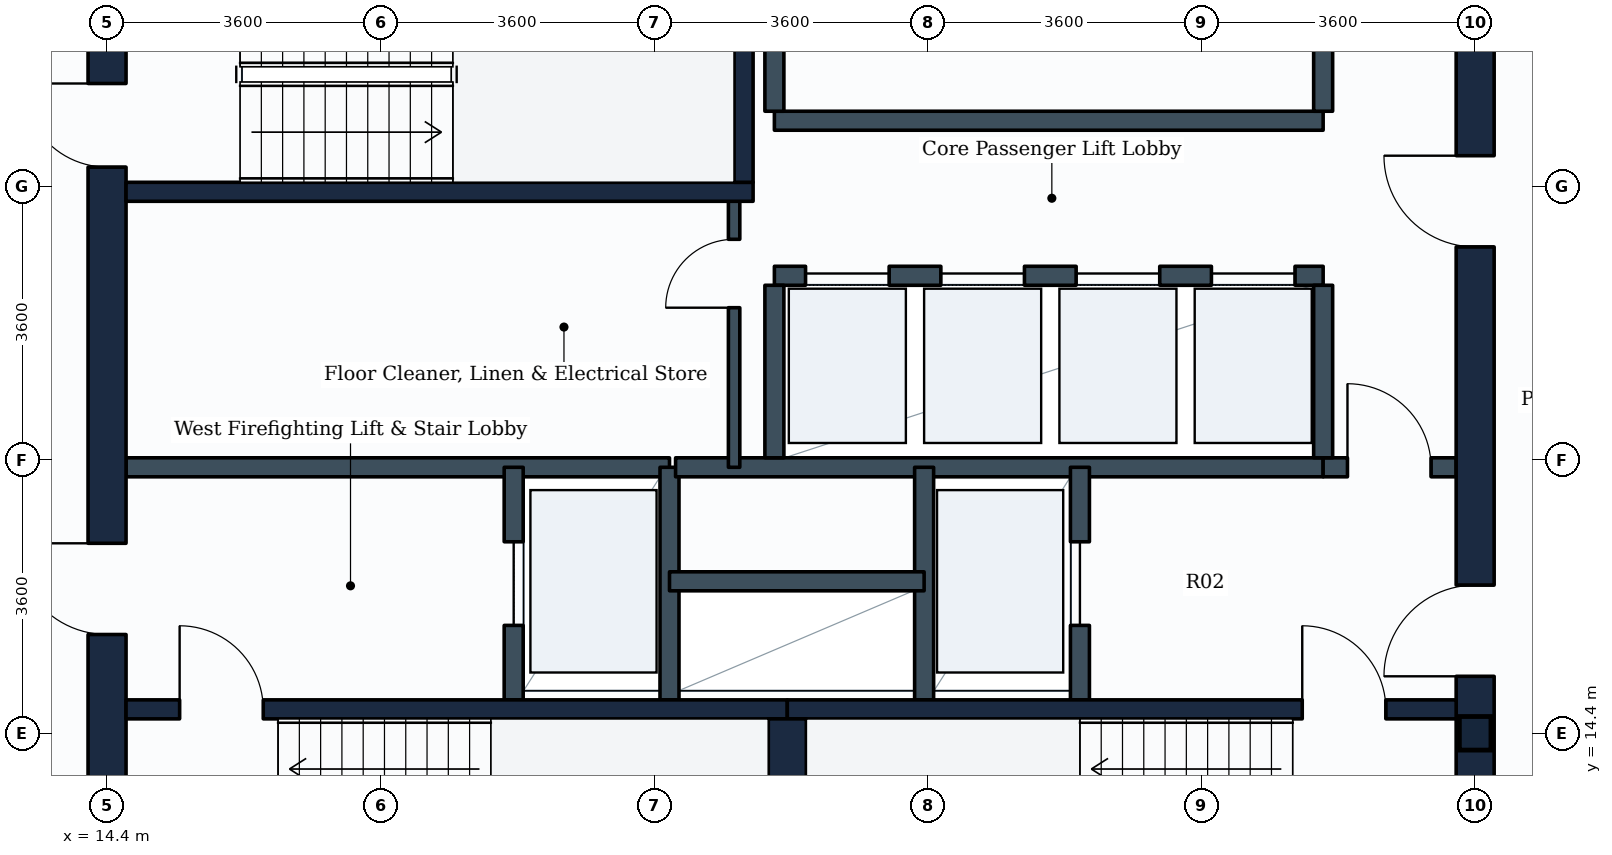
"""IFC4 building model, lengths in metres.
Left out: names, types, materials, properties, quantities, classifications, styles, units other than length and angle.
Written with IfcOpenShell. Run it as: python <this file> out.ifc"""

import sys

from ifc_helpers import new_model, si_unit, direction, frame, frame_2d, origin, origin_2d, place, context, subcontext, project, spatial, rectangle, i_section, extrude, element, fill, save


model = new_model("IFC4")
c1 = context("Model", 3, precision=1e-05, world=origin(), true_north=direction((0.0, 1.0)))
c2 = subcontext(c1, "Body", "Model", "MODEL_VIEW")
j1 = project(units=[si_unit("LENGTHUNIT", "METRE"), si_unit("PLANEANGLEUNIT", "RADIAN")], contexts=[c1])
p1 = place(None, origin())
s1 = spatial("IfcSite", under=j1, at=p1, CompositionType="ELEMENT")
p2 = place(p1, origin())
s2 = spatial("IfcBuilding", under=s1, at=p2, CompositionType="ELEMENT")
p3 = place(p2, frame((0.0, 0.0, 201.4)))
s3 = spatial("IfcBuildingStorey", under=s2, at=p3, CompositionType="ELEMENT", Elevation=201.4)
p4 = place(p3, frame((32.4, 14.4, 0.0), z_axis=(0.0, 0.0, 1.0), x_axis=(1.0, 0.0, 0.0)))
e1 = element("IfcColumn", 1, at=p4, inside=s3, PredefinedType="COLUMN", context=c2, shape_type="SweptSolid", body=[
    extrude(i_section(OverallWidth=0.416, OverallDepth=0.442, WebThickness=0.025, FlangeThickness=0.041, FilletRadius=0.015, at=origin_2d()), origin(), (0.0, 0.0, 1.0), 3.8),
])
p5 = place(p3, frame((14.4, 10.8, 0.0), z_axis=(0.0, 0.0, 1.0), x_axis=(0.0, 1.0, 0.0)))
e2 = element("IfcWall", 2, at=p5, inside=s3, PredefinedType="SHEAR", context=c2, shape_type="SweptSolid", body=[
    extrude(rectangle(XDim=14.4, YDim=0.5, at=frame_2d((7.2, 0.0))), origin(), (0.0, 0.0, 1.0), 3.55),
])
p6 = place(p5, frame((11.05, 0.0, 0.0)))
e3 = element("IfcOpeningElement", 3, at=p6, cuts=e2, PredefinedType="OPENING", context=c2, shape_type="SweptSolid", body=[
    extrude(rectangle(XDim=1.1, YDim=2.1, at=frame_2d((0.55, 1.05))), frame((0.0, 0.26, 0.0), z_axis=(0.0, -1.0, 0.0), x_axis=(1.0, 0.0, 0.0)), (0.0, 0.0, 1.0), 0.52),
])
p7 = place(p5, frame((4.9, 0.0, 0.0)))
e4 = element("IfcOpeningElement", 4, at=p7, cuts=e2, PredefinedType="OPENING", context=c2, shape_type="SweptSolid", body=[
    extrude(rectangle(XDim=1.2, YDim=2.1, at=frame_2d((0.6, 1.05))), frame((0.0, 0.26, 0.0), z_axis=(0.0, -1.0, 0.0), x_axis=(1.0, 0.0, 0.0)), (0.0, 0.0, 1.0), 0.52),
])
p8 = place(p3, frame((32.4, 10.8, 0.0), z_axis=(0.0, 0.0, 1.0), x_axis=(0.0, 1.0, 0.0)))
e5 = element("IfcWall", 5, at=p8, inside=s3, PredefinedType="SHEAR", context=c2, shape_type="SweptSolid", body=[
    extrude(rectangle(XDim=14.4, YDim=0.5, at=frame_2d((7.2, 0.0))), origin(), (0.0, 0.0, 1.0), 3.55),
])
p9 = place(p8, frame((4.35, 0.0, 0.0)))
e6 = element("IfcOpeningElement", 6, at=p9, cuts=e5, PredefinedType="OPENING", context=c2, shape_type="SweptSolid", body=[
    extrude(rectangle(XDim=1.2, YDim=2.1, at=frame_2d((0.6, 1.05))), frame((0.0, 0.26, 0.0), z_axis=(0.0, -1.0, 0.0), x_axis=(1.0, 0.0, 0.0)), (0.0, 0.0, 1.0), 0.52),
])
p10 = place(p8, frame((10.0, 0.0, 0.0)))
e7 = element("IfcOpeningElement", 7, at=p10, cuts=e5, PredefinedType="OPENING", context=c2, shape_type="SweptSolid", body=[
    extrude(rectangle(XDim=1.2, YDim=2.1, at=frame_2d((0.6, 1.05))), frame((0.0, 0.26, 0.0), z_axis=(0.0, -1.0, 0.0), x_axis=(1.0, 0.0, 0.0)), (0.0, 0.0, 1.0), 0.52),
])
p11 = place(p3, frame((14.65, 14.715, 0.0), z_axis=(0.0, 0.0, 1.0), x_axis=(1.0, 0.0, 0.0)))
e8 = element("IfcWall", 8, at=p11, inside=s3, PredefinedType="SHEAR", context=c2, shape_type="SweptSolid", body=[
    extrude(rectangle(XDim=8.7, YDim=0.25, at=frame_2d((4.35, 0.0))), origin(), (0.0, 0.0, 1.0), 3.55),
])
p12 = place(p11, frame((0.705, 0.0, 0.0)))
e9 = element("IfcOpeningElement", 9, at=p12, cuts=e8, PredefinedType="OPENING", context=c2, shape_type="SweptSolid", body=[
    extrude(rectangle(XDim=1.1, YDim=2.1, at=frame_2d((0.55, 1.05))), frame((0.0, 0.135, 0.0), z_axis=(0.0, -1.0, 0.0), x_axis=(1.0, 0.0, 0.0)), (0.0, 0.0, 1.0), 0.27),
])
p13 = place(p3, frame((23.35, 14.715, 0.0), z_axis=(0.0, 0.0, 1.0), x_axis=(1.0, 0.0, 0.0)))
e10 = element("IfcWall", 10, at=p13, inside=s3, PredefinedType="SHEAR", context=c2, shape_type="SweptSolid", body=[
    extrude(rectangle(XDim=8.8, YDim=0.25, at=frame_2d((4.4, 0.0))), origin(), (0.0, 0.0, 1.0), 3.55),
])
p14 = place(p13, frame((6.775, 0.0, 0.0)))
e11 = element("IfcOpeningElement", 11, at=p14, cuts=e10, PredefinedType="OPENING", context=c2, shape_type="SweptSolid", body=[
    extrude(rectangle(XDim=1.1, YDim=2.1, at=frame_2d((0.55, 1.05))), frame((0.0, 0.135, 0.0), z_axis=(0.0, -1.0, 0.0), x_axis=(1.0, 0.0, 0.0)), (0.0, 0.0, 1.0), 0.27),
])
p15 = place(p3, frame((23.35, 11.75, 0.0), z_axis=(0.0, 0.0, 1.0), x_axis=(0.0, 1.0, 0.0)))
e12 = element("IfcWall", 12, at=p15, inside=s3, PredefinedType="SHEAR", context=c2, shape_type="SweptSolid", body=[
    extrude(rectangle(XDim=2.84, YDim=0.5, at=frame_2d((1.42, 0.0))), origin(), (0.0, 0.0, 1.0), 3.55),
])
p16 = place(p3, frame((14.65, 21.525, 0.0), z_axis=(0.0, 0.0, 1.0), x_axis=(1.0, 0.0, 0.0)))
e13 = element("IfcWall", 13, at=p16, inside=s3, PredefinedType="SHEAR", context=c2, shape_type="SweptSolid", body=[
    extrude(rectangle(XDim=8.25, YDim=0.25, at=frame_2d((4.125, 0.0))), origin(), (0.0, 0.0, 1.0), 3.55),
])
p17 = place(p3, frame((22.775, 21.65, 0.0), z_axis=(0.0, 0.0, 1.0), x_axis=(0.0, 1.0, 0.0)))
e14 = element("IfcWall", 14, at=p17, inside=s3, PredefinedType="SHEAR", context=c2, shape_type="SweptSolid", body=[
    extrude(rectangle(XDim=2.84, YDim=0.25, at=frame_2d((1.42, 0.0))), origin(), (0.0, 0.0, 1.0), 3.55),
])
p18 = place(p3, frame((14.65, 17.9, 0.0), z_axis=(0.0, 0.0, 1.0), x_axis=(1.0, 0.0, 0.0)))
e15 = element("IfcWall", 15, at=p18, inside=s3, PredefinedType="PARTITIONING", context=c2, shape_type="SweptSolid", body=[
    extrude(rectangle(XDim=7.15, YDim=0.25, at=frame_2d((3.575, 0.0))), origin(), (0.0, 0.0, 1.0), 3.535),
])
p19 = place(p3, frame((19.75, 14.84, 0.0), z_axis=(0.0, 0.0, 1.0), x_axis=(0.0, 1.0, 0.0)))
e16 = element("IfcWall", 16, at=p19, inside=s3, PredefinedType="PARTITIONING", context=c2, shape_type="SweptSolid", body=[
    extrude(rectangle(XDim=3.06, YDim=0.25, at=frame_2d((1.53, 0.0))), origin(), (0.0, 0.0, 1.0), 3.535),
])
p20 = place(p19, frame((0.98, 0.0, 0.0)))
e17 = element("IfcOpeningElement", 17, at=p20, cuts=e16, PredefinedType="OPENING", context=c2, shape_type="SweptSolid", body=[
    extrude(rectangle(XDim=1.1, YDim=2.1, at=frame_2d((0.55, 1.05))), frame((0.0, 0.135, 0.0), z_axis=(0.0, -1.0, 0.0), x_axis=(1.0, 0.0, 0.0)), (0.0, 0.0, 1.0), 0.27),
])
p21 = place(p3, frame((21.8, 14.84, 0.0), z_axis=(0.0, 0.0, 1.0), x_axis=(0.0, 1.0, 0.0)))
e18 = element("IfcWall", 18, at=p21, inside=s3, PredefinedType="PARTITIONING", context=c2, shape_type="SweptSolid", body=[
    extrude(rectangle(XDim=3.06, YDim=0.25, at=frame_2d((1.53, 0.0))), origin(), (0.0, 0.0, 1.0), 3.535),
])
p22 = place(p3, frame((21.88, 17.9, 0.0), z_axis=(0.0, 0.0, 1.0), x_axis=(1.0, 0.0, 0.0)))
e19 = element("IfcWall", 19, at=p22, inside=s3, PredefinedType="PARTITIONING", context=c2, shape_type="SweptSolid", body=[
    extrude(rectangle(XDim=8.52, YDim=0.25, at=frame_2d((4.26, 0.0))), origin(), (0.0, 0.0, 1.0), 3.535),
])
p23 = place(p3, frame((30.4, 17.9, 0.0), z_axis=(0.0, 0.0, 1.0), x_axis=(1.0, 0.0, 0.0)))
e20 = element("IfcWall", 20, at=p23, inside=s3, PredefinedType="PARTITIONING", context=c2, shape_type="SweptSolid", body=[
    extrude(rectangle(XDim=1.75, YDim=0.25, at=frame_2d((0.875, 0.0))), origin(), (0.0, 0.0, 1.0), 3.535),
])
p24 = place(p23, frame((0.32, 0.0, 0.0)))
e21 = element("IfcOpeningElement", 21, at=p24, cuts=e20, PredefinedType="OPENING", context=c2, shape_type="SweptSolid", body=[
    extrude(rectangle(XDim=1.1, YDim=2.1, at=frame_2d((0.55, 1.05))), frame((0.0, 0.135, 0.0), z_axis=(0.0, -1.0, 0.0), x_axis=(1.0, 0.0, 0.0)), (0.0, 0.0, 1.0), 0.27),
])
p25 = place(p3, frame((25.15, 14.84, 0.0), z_axis=(0.0, 0.0, 1.0), x_axis=(0.0, 1.0, 0.0)))
e22 = element("IfcWall", 22, at=p25, inside=s3, PredefinedType="PARTITIONING", context=c2, shape_type="SweptSolid", body=[
    extrude(rectangle(XDim=3.06, YDim=0.25, at=frame_2d((1.53, 0.0))), origin(), (0.0, 0.0, 1.0), 3.535),
])
p26 = place(p3, frame((27.2, 14.84, 0.0), z_axis=(0.0, 0.0, 1.0), x_axis=(0.0, 1.0, 0.0)))
e23 = element("IfcWall", 23, at=p26, inside=s3, PredefinedType="PARTITIONING", context=c2, shape_type="SweptSolid", body=[
    extrude(rectangle(XDim=3.06, YDim=0.25, at=frame_2d((1.53, 0.0))), origin(), (0.0, 0.0, 1.0), 3.535),
])
p27 = place(p26, frame((0.98, 0.0, 0.0)))
e24 = element("IfcOpeningElement", 24, at=p27, cuts=e23, PredefinedType="OPENING", context=c2, shape_type="SweptSolid", body=[
    extrude(rectangle(XDim=1.1, YDim=2.1, at=frame_2d((0.55, 1.05))), frame((0.0, 0.135, 0.0), z_axis=(0.0, -1.0, 0.0), x_axis=(1.0, 0.0, 0.0)), (0.0, 0.0, 1.0), 0.27),
])
p28 = place(p3, frame((21.8, 16.4, 0.0), z_axis=(0.0, 0.0, 1.0), x_axis=(1.0, 0.0, 0.0)))
e25 = element("IfcWall", 25, at=p28, inside=s3, PredefinedType="PARTITIONING", context=c2, shape_type="SweptSolid", body=[
    extrude(rectangle(XDim=3.35, YDim=0.25, at=frame_2d((1.675, 0.0))), origin(), (0.0, 0.0, 1.0), 3.535),
])
p29 = place(p3, frame((23.18, 20.42, 0.0), z_axis=(0.0, 0.0, 1.0), x_axis=(1.0, 0.0, 0.0)))
e26 = element("IfcWall", 26, at=p29, inside=s3, PredefinedType="PARTITIONING", context=c2, shape_type="SweptSolid", body=[
    extrude(rectangle(XDim=7.22, YDim=0.25, at=frame_2d((3.61, 0.0))), origin(), (0.0, 0.0, 1.0), 3.535),
])
p30 = place(p29, frame((0.41, 0.0, 0.0)))
e27 = element("IfcOpeningElement", 27, at=p30, cuts=e26, PredefinedType="OPENING", context=c2, shape_type="SweptSolid", body=[
    extrude(rectangle(XDim=1.1, YDim=2.1, at=frame_2d((0.55, 1.05))), frame((0.0, 0.135, 0.0), z_axis=(0.0, -1.0, 0.0), x_axis=(1.0, 0.0, 0.0)), (0.0, 0.0, 1.0), 0.27),
])
p31 = place(p29, frame((2.19, 0.0, 0.0)))
e28 = element("IfcOpeningElement", 28, at=p31, cuts=e26, PredefinedType="OPENING", context=c2, shape_type="SweptSolid", body=[
    extrude(rectangle(XDim=1.1, YDim=2.1, at=frame_2d((0.55, 1.05))), frame((0.0, 0.135, 0.0), z_axis=(0.0, -1.0, 0.0), x_axis=(1.0, 0.0, 0.0)), (0.0, 0.0, 1.0), 0.27),
])
p32 = place(p29, frame((3.97, 0.0, 0.0)))
e29 = element("IfcOpeningElement", 29, at=p32, cuts=e26, PredefinedType="OPENING", context=c2, shape_type="SweptSolid", body=[
    extrude(rectangle(XDim=1.1, YDim=2.1, at=frame_2d((0.55, 1.05))), frame((0.0, 0.135, 0.0), z_axis=(0.0, -1.0, 0.0), x_axis=(1.0, 0.0, 0.0)), (0.0, 0.0, 1.0), 0.27),
])
p33 = place(p29, frame((5.75, 0.0, 0.0)))
e30 = element("IfcOpeningElement", 30, at=p33, cuts=e26, PredefinedType="OPENING", context=c2, shape_type="SweptSolid", body=[
    extrude(rectangle(XDim=1.1, YDim=2.1, at=frame_2d((0.55, 1.05))), frame((0.0, 0.135, 0.0), z_axis=(0.0, -1.0, 0.0), x_axis=(1.0, 0.0, 0.0)), (0.0, 0.0, 1.0), 0.27),
])
for number, where, z_axis, x_axis in (
    (31, (23.18, 18.025, 0.0), (0.0, 0.0, 1.0), (0.0, 1.0, 0.0)),
    (32, (30.4, 18.025, 0.0), (0.0, 0.0, 1.0), (0.0, 1.0, 0.0)),
):
    element("IfcWall", number, at=place(p3, frame(where, z_axis=z_axis, x_axis=x_axis)), inside=s3, PredefinedType="PARTITIONING", context=c2, shape_type="SweptSolid", body=[
        extrude(rectangle(XDim=2.27, YDim=0.25, at=frame_2d((1.135, 0.0))), origin(), (0.0, 0.0, 1.0), 3.535),
    ])
p34 = place(p3, frame((23.18, 22.46, 0.0), z_axis=(0.0, 0.0, 1.0), x_axis=(1.0, 0.0, 0.0)))
e33 = element("IfcWall", 33, at=p34, inside=s3, PredefinedType="PARTITIONING", context=c2, shape_type="SweptSolid", body=[
    extrude(rectangle(XDim=7.22, YDim=0.25, at=frame_2d((3.61, 0.0))), origin(), (0.0, 0.0, 1.0), 3.535),
])
for number, where, z_axis, x_axis in (
    (34, (23.18, 22.585, 0.0), (0.0, 0.0, 1.0), (0.0, 1.0, 0.0)),
    (35, (30.4, 22.585, 0.0), (0.0, 0.0, 1.0), (0.0, 1.0, 0.0)),
):
    element("IfcWall", number, at=place(p3, frame(where, z_axis=z_axis, x_axis=x_axis)), inside=s3, PredefinedType="PARTITIONING", context=c2, shape_type="SweptSolid", body=[
        extrude(rectangle(XDim=2.315, YDim=0.25, at=frame_2d((1.157, 0.0))), origin(), (0.0, 0.0, 1.0), 3.535),
    ])
p35 = place(p3, frame((22.65, 17.9, 0.0), z_axis=(0.0, 0.0, 1.0), x_axis=(0.0, 1.0, 0.0)))
e36 = element("IfcWall", 36, at=p35, inside=s3, PredefinedType="PARTITIONING", context=c2, shape_type="SweptSolid", body=[
    extrude(rectangle(XDim=3.625, YDim=0.15, at=frame_2d((1.812, 0.0))), origin(), (0.0, 0.0, 1.0), 3.535),
])
p36 = place(p35, frame((2.1, 0.0, 0.0)))
e37 = element("IfcOpeningElement", 37, at=p36, cuts=e36, PredefinedType="OPENING", context=c2, shape_type="SweptSolid", body=[
    extrude(rectangle(XDim=0.9, YDim=2.1, at=frame_2d((0.45, 1.05))), frame((0.0, 0.085, 0.0), z_axis=(0.0, -1.0, 0.0), x_axis=(1.0, 0.0, 0.0)), (0.0, 0.0, 1.0), 0.17),
])
p37 = place(p12, origin())
e38 = element("IfcDoor", 38, at=p37, inside=s3, OperationType="SINGLE_SWING_LEFT", PredefinedType="DOOR", context=c2, shape_type="SweptSolid", body=[
    extrude(rectangle(XDim=1.1, YDim=2.1, at=frame_2d((0.55, 1.05))), frame((0.0, 0.025, 0.0), z_axis=(0.0, -1.0, 0.0), x_axis=(1.0, 0.0, 0.0)), (0.0, 0.0, 1.0), 0.05),
])
fill(e9, e38)
p38 = place(p14, origin())
e39 = element("IfcDoor", 39, at=p38, inside=s3, OperationType="SINGLE_SWING_LEFT", PredefinedType="DOOR", context=c2, shape_type="SweptSolid", body=[
    extrude(rectangle(XDim=1.1, YDim=2.1, at=frame_2d((0.55, 1.05))), frame((0.0, 0.025, 0.0), z_axis=(0.0, -1.0, 0.0), x_axis=(1.0, 0.0, 0.0)), (0.0, 0.0, 1.0), 0.05),
])
fill(e11, e39)
p39 = place(p6, origin())
e40 = element("IfcDoor", 40, at=p39, inside=s3, OperationType="SINGLE_SWING_RIGHT", PredefinedType="DOOR", context=c2, shape_type="SweptSolid", body=[
    extrude(rectangle(XDim=1.1, YDim=2.1, at=frame_2d((0.55, 1.05))), frame((0.0, 0.025, 0.0), z_axis=(0.0, -1.0, 0.0), x_axis=(1.0, 0.0, 0.0)), (0.0, 0.0, 1.0), 0.05),
])
fill(e3, e40)
p40 = place(p20, origin())
e41 = element("IfcDoor", 41, at=p40, inside=s3, OperationType="SLIDING_TO_LEFT", PredefinedType="DOOR", context=c2, shape_type="SweptSolid", body=[
    extrude(rectangle(XDim=1.1, YDim=2.1, at=frame_2d((0.55, 1.05))), frame((0.0, 0.025, 0.0), z_axis=(0.0, -1.0, 0.0), x_axis=(1.0, 0.0, 0.0)), (0.0, 0.0, 1.0), 0.05),
])
fill(e17, e41)
p41 = place(p27, origin())
e42 = element("IfcDoor", 42, at=p41, inside=s3, OperationType="SLIDING_TO_LEFT", PredefinedType="DOOR", context=c2, shape_type="SweptSolid", body=[
    extrude(rectangle(XDim=1.1, YDim=2.1, at=frame_2d((0.55, 1.05))), frame((0.0, 0.025, 0.0), z_axis=(0.0, -1.0, 0.0), x_axis=(1.0, 0.0, 0.0)), (0.0, 0.0, 1.0), 0.05),
])
fill(e24, e42)
p42 = place(p7, origin())
e43 = element("IfcDoor", 43, at=p42, inside=s3, OperationType="SINGLE_SWING_RIGHT", PredefinedType="DOOR", context=c2, shape_type="SweptSolid", body=[
    extrude(rectangle(XDim=1.2, YDim=2.1, at=frame_2d((0.6, 1.05))), frame((0.0, 0.025, 0.0), z_axis=(0.0, -1.0, 0.0), x_axis=(1.0, 0.0, 0.0)), (0.0, 0.0, 1.0), 0.05),
])
fill(e4, e43)
p43 = place(p9, origin())
e44 = element("IfcDoor", 44, at=p43, inside=s3, OperationType="SINGLE_SWING_LEFT", PredefinedType="DOOR", context=c2, shape_type="SweptSolid", body=[
    extrude(rectangle(XDim=1.2, YDim=2.1, at=frame_2d((0.6, 1.05))), frame((0.0, 0.025, 0.0), z_axis=(0.0, -1.0, 0.0), x_axis=(1.0, 0.0, 0.0)), (0.0, 0.0, 1.0), 0.05),
])
fill(e6, e44)
p44 = place(p24, origin())
e45 = element("IfcDoor", 45, at=p44, inside=s3, OperationType="SINGLE_SWING_LEFT", PredefinedType="DOOR", context=c2, shape_type="SweptSolid", body=[
    extrude(rectangle(XDim=1.1, YDim=2.1, at=frame_2d((0.55, 1.05))), frame((0.0, 0.025, 0.0), z_axis=(0.0, -1.0, 0.0), x_axis=(1.0, 0.0, 0.0)), (0.0, 0.0, 1.0), 0.05),
])
fill(e21, e45)
p45 = place(p30, origin())
e46 = element("IfcDoor", 46, at=p45, inside=s3, OperationType="SLIDING_TO_LEFT", PredefinedType="DOOR", context=c2, shape_type="SweptSolid", body=[
    extrude(rectangle(XDim=1.1, YDim=2.1, at=frame_2d((0.55, 1.05))), frame((0.0, 0.025, 0.0), z_axis=(0.0, -1.0, 0.0), x_axis=(1.0, 0.0, 0.0)), (0.0, 0.0, 1.0), 0.05),
])
fill(e27, e46)
p46 = place(p31, origin())
e47 = element("IfcDoor", 47, at=p46, inside=s3, OperationType="SLIDING_TO_LEFT", PredefinedType="DOOR", context=c2, shape_type="SweptSolid", body=[
    extrude(rectangle(XDim=1.1, YDim=2.1, at=frame_2d((0.55, 1.05))), frame((0.0, 0.025, 0.0), z_axis=(0.0, -1.0, 0.0), x_axis=(1.0, 0.0, 0.0)), (0.0, 0.0, 1.0), 0.05),
])
fill(e28, e47)
p47 = place(p32, origin())
e48 = element("IfcDoor", 48, at=p47, inside=s3, OperationType="SLIDING_TO_LEFT", PredefinedType="DOOR", context=c2, shape_type="SweptSolid", body=[
    extrude(rectangle(XDim=1.1, YDim=2.1, at=frame_2d((0.55, 1.05))), frame((0.0, 0.025, 0.0), z_axis=(0.0, -1.0, 0.0), x_axis=(1.0, 0.0, 0.0)), (0.0, 0.0, 1.0), 0.05),
])
fill(e29, e48)
p48 = place(p33, origin())
e49 = element("IfcDoor", 49, at=p48, inside=s3, OperationType="SLIDING_TO_LEFT", PredefinedType="DOOR", context=c2, shape_type="SweptSolid", body=[
    extrude(rectangle(XDim=1.1, YDim=2.1, at=frame_2d((0.55, 1.05))), frame((0.0, 0.025, 0.0), z_axis=(0.0, -1.0, 0.0), x_axis=(1.0, 0.0, 0.0)), (0.0, 0.0, 1.0), 0.05),
])
fill(e30, e49)
p49 = place(p10, origin())
e50 = element("IfcDoor", 50, at=p49, inside=s3, OperationType="SINGLE_SWING_RIGHT", PredefinedType="DOOR", context=c2, shape_type="SweptSolid", body=[
    extrude(rectangle(XDim=1.2, YDim=2.1, at=frame_2d((0.6, 1.05))), frame((0.0, 0.025, 0.0), z_axis=(0.0, -1.0, 0.0), x_axis=(1.0, 0.0, 0.0)), (0.0, 0.0, 1.0), 0.05),
])
fill(e7, e50)
p50 = place(p36, origin())
e51 = element("IfcDoor", 51, at=p50, inside=s3, OperationType="SINGLE_SWING_LEFT", PredefinedType="DOOR", context=c2, shape_type="SweptSolid", body=[
    extrude(rectangle(XDim=0.9, YDim=2.1, at=frame_2d((0.45, 1.05))), frame((0.0, 0.025, 0.0), z_axis=(0.0, -1.0, 0.0), x_axis=(1.0, 0.0, 0.0)), (0.0, 0.0, 1.0), 0.05),
])
fill(e37, e51)
save(model, sys.argv[1])
